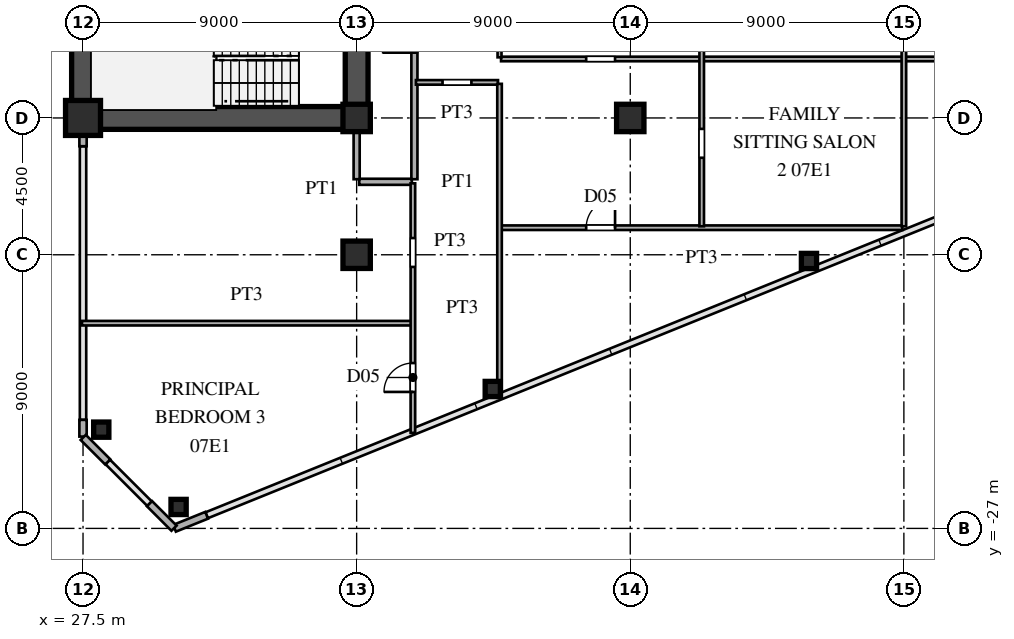
"""IFC4 building model, lengths in metres.
Left out: names, types, materials, properties, quantities, classifications, styles, units other than length and angle.
Written with IfcOpenShell. Run it as: python <this file> out.ifc"""

import sys

from ifc_helpers import new_model, si_unit, direction, frame, frame_2d, origin, origin_2d, place, context, subcontext, project, spatial, rectangle, hollow_rectangle, i_section, extrude, source, transform, mapped, element, fill, save


model = new_model("IFC4")
c1 = context("Model", 3, precision=1e-05, world=origin(), true_north=direction((0.0, 1.0)))
c2 = subcontext(c1, "Body", "Model", "MODEL_VIEW")
j1 = project(units=[si_unit("LENGTHUNIT", "METRE"), si_unit("PLANEANGLEUNIT", "RADIAN")], contexts=[c1])
p1 = place(None, origin())
s1 = spatial("IfcSite", under=j1, at=p1, CompositionType="ELEMENT")
p2 = place(p1, origin())
s2 = spatial("IfcBuilding", under=s1, at=p2, CompositionType="ELEMENT")
p3 = place(p2, frame((0.0, 0.0, 29.7)))
s3 = spatial("IfcBuildingStorey", under=s2, at=p3, CompositionType="ELEMENT", Elevation=29.7)
m1 = source(origin(), c2, "Body", "SweptSolid", [
    extrude(hollow_rectangle(XDim=1.15, YDim=1.15, WallThickness=0.048, at=origin_2d()), origin(), (0.0, 0.0, 1.0), 3.6),
])
p4 = place(p3, frame((27.5, -13.5, 0.0), z_axis=(0.0, 0.0, 1.0), x_axis=(1.0, 0.0, 0.0)))
e1 = element("IfcColumn", 1, at=p4, inside=s3, PredefinedType="COLUMN", context=c2, shape_type="MappedRepresentation", body=[
    mapped(m1, transform((0.0, 0.0, 0.0), scale=1.0)),
])
m2 = source(origin(), c2, "Body", "SweptSolid", [
    extrude(i_section(OverallWidth=0.9, OverallDepth=0.9, WebThickness=0.036, FlangeThickness=0.055, at=origin_2d()), origin(), (0.0, 0.0, 1.0), 3.6),
])
for number, where, z_axis, x_axis in (
    (2, (36.5, -18.0, 0.0), (0.0, 0.0, 1.0), (1.0, 0.0, 0.0)),
    (3, (36.5, -13.5, 0.0), (0.0, 0.0, 1.0), (1.0, 0.0, 0.0)),
    (4, (45.5, -13.5, 0.0), (0.0, 0.0, 1.0), (1.0, 0.0, 0.0)),
):
    element("IfcColumn", number, at=place(p3, frame(where, z_axis=z_axis, x_axis=x_axis)), inside=s3, PredefinedType="COLUMN", context=c2, shape_type="MappedRepresentation", body=[
        mapped(m2, transform((0.0, 0.0, 0.0), scale=1.0)),
    ])
m3 = source(origin(), c2, "Body", "SweptSolid", [
    extrude(hollow_rectangle(XDim=0.5, YDim=0.5, WallThickness=0.02, at=origin_2d()), origin(), (0.0, 0.0, 1.0), 3.6),
])
for number, where, z_axis, x_axis in (
    (5, (30.643, -26.295, 0.0), (0.0, 0.0, 1.0), (1.0, 0.0, 0.0)),
    (6, (28.1, -23.751, 0.0), (0.0, 0.0, 1.0), (1.0, 0.0, 0.0)),
    (7, (40.977, -22.414, 0.0), (0.0, 0.0, 1.0), (1.0, 0.0, 0.0)),
    (8, (51.378, -18.204, 0.0), (0.0, 0.0, 1.0), (1.0, 0.0, 0.0)),
):
    element("IfcColumn", number, at=place(p3, frame(where, z_axis=z_axis, x_axis=x_axis)), inside=s3, PredefinedType="COLUMN", context=c2, shape_type="MappedRepresentation", body=[
        mapped(m3, transform((0.0, 0.0, 0.0), scale=1.0)),
    ])
p5 = place(p3, frame((30.509, -26.996, 0.0), z_axis=(0.0, 0.0, 1.0), x_axis=(0.927007103665, 0.375043770452, 0.0)))
e9 = element("IfcWall", 9, at=p5, inside=s3, PredefinedType="SOLIDWALL", context=c2, shape_type="SweptSolid", body=[
    extrude(rectangle(XDim=1.14, YDim=0.24, at=frame_2d((0.57, 0.0))), origin(), (0.0, 0.0, 1.0), 3.38),
])
p6 = place(p3, frame((27.5, -23.98, 0.0), z_axis=(0.0, 0.0, 1.0), x_axis=(0.0, 1.0, 0.0)))
e10 = element("IfcWall", 10, at=p6, inside=s3, PredefinedType="SOLIDWALL", context=c2, shape_type="SweptSolid", body=[
    extrude(rectangle(XDim=0.55, YDim=0.24, at=frame_2d((0.275, 0.0))), origin(), (0.0, 0.0, 1.0), 3.38),
])
p7 = place(p3, frame((27.5, -14.43, 0.0), z_axis=(0.0, 0.0, 1.0), x_axis=(0.0, 1.0, 0.0)))
e11 = element("IfcWall", 11, at=p7, inside=s3, PredefinedType="SOLIDWALL", context=c2, shape_type="SweptSolid", body=[
    extrude(rectangle(XDim=0.55, YDim=0.24, at=frame_2d((0.275, 0.0))), origin(), (0.0, 0.0, 1.0), 2.88),
])
for number, where, z_axis, x_axis in (
    (12, (27.507, -24.007, 0.0), (0.0, 0.0, 1.0), (0.707, -0.707, 0.0)),
    (13, (29.687, -26.187, 0.0), (0.0, 0.0, 1.0), (0.707, -0.707, 0.0)),
):
    element("IfcWall", number, at=place(p3, frame(where, z_axis=z_axis, x_axis=x_axis)), inside=s3, PredefinedType="SOLIDWALL", context=c2, shape_type="SweptSolid", body=[
        extrude(rectangle(XDim=1.14, YDim=0.24, at=frame_2d((0.57, 0.0))), origin(), (0.0, 0.0, 1.0), 3.38),
    ])
p8 = place(p3, frame((27.5, -13.5, 0.0), z_axis=(0.0, 0.0, 1.0), x_axis=(0.0, 1.0, 0.0)))
e14 = element("IfcWall", 14, at=p8, inside=s3, PredefinedType="SHEAR", context=c2, shape_type="SweptSolid", body=[
    extrude(rectangle(XDim=12.2, YDim=0.75, at=frame_2d((6.1, 0.0))), origin(), (0.0, 0.0, 1.0), 3.38),
])
p9 = place(p3, frame((27.5, -13.5, 0.0), z_axis=(0.0, 0.0, 1.0), x_axis=(1.0, 0.0, 0.0)))
e15 = element("IfcWall", 15, at=p9, inside=s3, PredefinedType="SHEAR", context=c2, shape_type="SweptSolid", body=[
    extrude(rectangle(XDim=9.0, YDim=0.75, at=frame_2d((4.5, 0.0))), origin(), (0.0, 0.0, 1.0), 3.38),
])
p10 = place(p3, frame((36.5, -13.65, 0.0), z_axis=(0.0, 0.0, 1.0), x_axis=(0.0, 1.0, 0.0)))
e16 = element("IfcWall", 16, at=p10, inside=s3, PredefinedType="SHEAR", context=c2, shape_type="SweptSolid", body=[
    extrude(rectangle(XDim=7.15, YDim=0.75, at=frame_2d((3.575, 0.0))), origin(), (0.0, 0.0, 1.0), 3.38),
])
p11 = place(p10, frame((4.675, 0.0, 0.0)))
e17 = element("IfcOpeningElement", 17, at=p11, cuts=e16, PredefinedType="OPENING", context=c2, shape_type="SweptSolid", body=[
    extrude(rectangle(XDim=1.15, YDim=2.2, at=frame_2d((0.575, 1.1))), frame((0.0, 0.385, 0.0), z_axis=(0.0, -1.0, 0.0), x_axis=(1.0, 0.0, 0.0)), (0.0, 0.0, 1.0), 0.77),
])
p12 = place(p3, frame((27.465, -20.25, 0.0), z_axis=(0.0, 0.0, 1.0), x_axis=(1.0, 0.0, 0.0)))
e18 = element("IfcWall", 18, at=p12, inside=s3, PredefinedType="PARTITIONING", context=c2, shape_type="SweptSolid", body=[
    extrude(rectangle(XDim=10.835, YDim=0.15, at=frame_2d((5.417, 0.0))), origin(), (0.0, 0.0, 1.0), 3.38),
])
p13 = place(p3, frame((41.25, -17.11, 0.0), z_axis=(0.0, 0.0, 1.0), x_axis=(1.0, 0.0, 0.0)))
e19 = element("IfcWall", 19, at=p13, inside=s3, PredefinedType="PARTITIONING", context=c2, shape_type="SweptSolid", body=[
    extrude(rectangle(XDim=13.2, YDim=0.15, at=frame_2d((6.6, 0.0))), origin(), (0.0, 0.0, 1.0), 3.38),
])
p14 = place(p13, frame((2.8, 0.0, 0.0)))
e20 = element("IfcOpeningElement", 20, at=p14, cuts=e19, PredefinedType="OPENING", context=c2, shape_type="SweptSolid", body=[
    extrude(rectangle(XDim=0.95, YDim=2.15, at=frame_2d((0.475, 1.075))), frame((0.0, 0.085, 0.0), z_axis=(0.0, -1.0, 0.0), x_axis=(1.0, 0.0, 0.0)), (0.0, 0.0, 1.0), 0.17),
])
p15 = place(p3, frame((36.585, -15.6, 0.0), z_axis=(0.0, 0.0, 1.0), x_axis=(1.0, 0.0, 0.0)))
e21 = element("IfcWall", 21, at=p15, inside=s3, PredefinedType="PARTITIONING", context=c2, shape_type="SweptSolid", body=[
    extrude(rectangle(XDim=1.73, YDim=0.2, at=frame_2d((0.865, 0.0))), origin(), (0.0, 0.0, 1.0), 3.38),
])
p16 = place(p3, frame((38.45, -12.33, 0.0), z_axis=(0.0, 0.0, 1.0), x_axis=(1.0, 0.0, 0.0)))
e22 = element("IfcWall", 22, at=p16, inside=s3, PredefinedType="PARTITIONING", context=c2, shape_type="SweptSolid", body=[
    extrude(rectangle(XDim=2.7, YDim=0.15, at=frame_2d((1.35, 0.0))), origin(), (0.0, 0.0, 1.0), 3.38),
])
p17 = place(p16, frame((0.875, 0.0, 0.0)))
e23 = element("IfcOpeningElement", 23, at=p17, cuts=e22, PredefinedType="OPENING", context=c2, shape_type="SweptSolid", body=[
    extrude(rectangle(XDim=0.95, YDim=2.15, at=frame_2d((0.475, 1.075))), frame((0.0, 0.085, 0.0), z_axis=(0.0, -1.0, 0.0), x_axis=(1.0, 0.0, 0.0)), (0.0, 0.0, 1.0), 0.17),
])
p18 = place(p3, frame((41.25, -11.56, 0.0), z_axis=(0.0, 0.0, 1.0), x_axis=(1.0, 0.0, 0.0)))
e24 = element("IfcWall", 24, at=p18, inside=s3, PredefinedType="PARTITIONING", context=c2, shape_type="SweptSolid", body=[
    extrude(rectangle(XDim=27.44, YDim=0.15, at=frame_2d((13.72, 0.0))), origin(), (0.0, 0.0, 1.0), 3.38),
])
p19 = place(p18, frame((2.8, 0.0, 0.0)))
e25 = element("IfcOpeningElement", 25, at=p19, cuts=e24, PredefinedType="OPENING", context=c2, shape_type="SweptSolid", body=[
    extrude(rectangle(XDim=0.95, YDim=2.15, at=frame_2d((0.475, 1.075))), frame((0.0, 0.085, 0.0), z_axis=(0.0, -1.0, 0.0), x_axis=(1.0, 0.0, 0.0)), (0.0, 0.0, 1.0), 0.17),
])
p20 = place(p18, frame((15.625, 0.0, 0.0)))
e26 = element("IfcOpeningElement", 26, at=p20, cuts=e24, PredefinedType="OPENING", context=c2, shape_type="SweptSolid", body=[
    extrude(rectangle(XDim=0.95, YDim=2.15, at=frame_2d((0.475, 1.075))), frame((0.0, 0.085, 0.0), z_axis=(0.0, -1.0, 0.0), x_axis=(1.0, 0.0, 0.0)), (0.0, 0.0, 1.0), 0.17),
])
p21 = place(p3, frame((36.5, -15.515, 0.0), z_axis=(0.0, 0.0, 1.0), x_axis=(0.0, 1.0, 0.0)))
e27 = element("IfcWall", 27, at=p21, inside=s3, PredefinedType="PARTITIONING", context=c2, shape_type="SweptSolid", body=[
    extrude(rectangle(XDim=1.635, YDim=0.2, at=frame_2d((0.817, 0.0))), origin(), (0.0, 0.0, 1.0), 2.68),
])
p22 = place(p3, frame((38.35, -23.858, 0.0), z_axis=(0.0, 0.0, 1.0), x_axis=(0.0, 1.0, 0.0)))
e28 = element("IfcWall", 28, at=p22, inside=s3, PredefinedType="PARTITIONING", context=c2, shape_type="SweptSolid", body=[
    extrude(rectangle(XDim=8.208, YDim=0.15, at=frame_2d((4.104, 0.0))), origin(), (0.0, 0.0, 1.0), 3.38),
])
p23 = place(p22, frame((1.347, 0.0, 0.0)))
e29 = element("IfcOpeningElement", 29, at=p23, cuts=e28, PredefinedType="OPENING", context=c2, shape_type="SweptSolid", body=[
    extrude(rectangle(XDim=0.95, YDim=2.15, at=frame_2d((0.475, 1.075))), frame((0.0, 0.085, 0.0), z_axis=(0.0, -1.0, 0.0), x_axis=(1.0, 0.0, 0.0)), (0.0, 0.0, 1.0), 0.17),
])
p24 = place(p22, frame((5.458, 0.0, 0.0)))
e30 = element("IfcOpeningElement", 30, at=p24, cuts=e28, PredefinedType="OPENING", context=c2, shape_type="SweptSolid", body=[
    extrude(rectangle(XDim=0.95, YDim=2.15, at=frame_2d((0.475, 1.075))), frame((0.0, 0.085, 0.0), z_axis=(0.0, -1.0, 0.0), x_axis=(1.0, 0.0, 0.0)), (0.0, 0.0, 1.0), 0.17),
])
p25 = place(p3, frame((38.4, -15.515, 0.0), z_axis=(0.0, 0.0, 1.0), x_axis=(0.0, 1.0, 0.0)))
e31 = element("IfcWall", 31, at=p25, inside=s3, PredefinedType="PARTITIONING", context=c2, shape_type="SweptSolid", body=[
    extrude(rectangle(XDim=31.03, YDim=0.2, at=frame_2d((15.515, 0.0))), origin(), (0.0, 0.0, 1.0), 3.38),
])
p26 = place(p25, frame((4.163, 0.0, 0.0)))
e32 = element("IfcOpeningElement", 32, at=p26, cuts=e31, PredefinedType="OPENING", context=c2, shape_type="SweptSolid", body=[
    extrude(rectangle(XDim=1.05, YDim=2.25, at=frame_2d((0.525, 1.125))), frame((0.0, 0.11, 0.0), z_axis=(0.0, -1.0, 0.0), x_axis=(1.0, 0.0, 0.0)), (0.0, 0.0, 1.0), 0.22),
])
p27 = place(p25, frame((15.538, 0.0, 0.0)))
e33 = element("IfcOpeningElement", 33, at=p27, cuts=e31, PredefinedType="OPENING", context=c2, shape_type="SweptSolid", body=[
    extrude(rectangle(XDim=1.05, YDim=2.25, at=frame_2d((0.525, 1.125))), frame((0.0, 0.11, 0.0), z_axis=(0.0, -1.0, 0.0), x_axis=(1.0, 0.0, 0.0)), (0.0, 0.0, 1.0), 0.22),
])
p28 = place(p25, frame((26.635, 0.0, 0.0)))
e34 = element("IfcOpeningElement", 34, at=p28, cuts=e31, PredefinedType="OPENING", context=c2, shape_type="SweptSolid", body=[
    extrude(rectangle(XDim=1.05, YDim=2.25, at=frame_2d((0.525, 1.125))), frame((0.0, 0.11, 0.0), z_axis=(0.0, -1.0, 0.0), x_axis=(1.0, 0.0, 0.0)), (0.0, 0.0, 1.0), 0.22),
])
p29 = place(p3, frame((41.2, -22.704, 0.0), z_axis=(0.0, 0.0, 1.0), x_axis=(0.0, 1.0, 0.0)))
e35 = element("IfcWall", 35, at=p29, inside=s3, PredefinedType="PARTITIONING", context=c2, shape_type="SweptSolid", body=[
    extrude(rectangle(XDim=10.326, YDim=0.15, at=frame_2d((5.163, 0.0))), origin(), (0.0, 0.0, 1.0), 3.38),
])
p30 = place(p3, frame((41.2, -11.506, 0.0), z_axis=(0.0, 0.0, 1.0), x_axis=(0.0, 1.0, 0.0)))
e36 = element("IfcWall", 36, at=p30, inside=s3, PredefinedType="PARTITIONING", context=c2, shape_type="SweptSolid", body=[
    extrude(rectangle(XDim=14.456, YDim=0.13, at=frame_2d((7.228, 0.0))), origin(), (0.0, 0.0, 1.0), 3.38),
])
p31 = place(p30, frame((0.589, 0.0, 0.0)))
e37 = element("IfcOpeningElement", 37, at=p31, cuts=e36, PredefinedType="OPENING", context=c2, shape_type="SweptSolid", body=[
    extrude(rectangle(XDim=0.95, YDim=2.15, at=frame_2d((0.475, 1.075))), frame((0.0, 0.075, 0.0), z_axis=(0.0, -1.0, 0.0), x_axis=(1.0, 0.0, 0.0)), (0.0, 0.0, 1.0), 0.15),
])
p32 = place(p30, frame((11.781, 0.0, 0.0)))
e38 = element("IfcOpeningElement", 38, at=p32, cuts=e36, PredefinedType="OPENING", context=c2, shape_type="SweptSolid", body=[
    extrude(rectangle(XDim=0.95, YDim=2.15, at=frame_2d((0.475, 1.075))), frame((0.0, 0.075, 0.0), z_axis=(0.0, -1.0, 0.0), x_axis=(1.0, 0.0, 0.0)), (0.0, 0.0, 1.0), 0.15),
])
p33 = place(p3, frame((47.85, -17.063, 0.0), z_axis=(0.0, 0.0, 1.0), x_axis=(0.0, 1.0, 0.0)))
e39 = element("IfcWall", 39, at=p33, inside=s3, PredefinedType="PARTITIONING", context=c2, shape_type="SweptSolid", body=[
    extrude(rectangle(XDim=34.626, YDim=0.15, at=frame_2d((17.313, 0.0))), origin(), (0.0, 0.0, 1.0), 3.38),
])
p34 = place(p33, frame((7.81, 0.0, 0.0)))
e40 = element("IfcOpeningElement", 40, at=p34, cuts=e39, PredefinedType="OPENING", context=c2, shape_type="SweptSolid", body=[
    extrude(rectangle(XDim=0.95, YDim=2.15, at=frame_2d((0.475, 1.075))), frame((0.0, 0.085, 0.0), z_axis=(0.0, -1.0, 0.0), x_axis=(1.0, 0.0, 0.0)), (0.0, 0.0, 1.0), 0.17),
])
p35 = place(p33, frame((2.253, 0.0, 0.0)))
e41 = element("IfcOpeningElement", 41, at=p35, cuts=e39, PredefinedType="OPENING", context=c2, shape_type="SweptSolid", body=[
    extrude(rectangle(XDim=0.95, YDim=2.15, at=frame_2d((0.475, 1.075))), frame((0.0, 0.085, 0.0), z_axis=(0.0, -1.0, 0.0), x_axis=(1.0, 0.0, 0.0)), (0.0, 0.0, 1.0), 0.17),
])
p36 = place(p33, frame((17.338, 0.0, 0.0)))
e42 = element("IfcOpeningElement", 42, at=p36, cuts=e39, PredefinedType="OPENING", context=c2, shape_type="SweptSolid", body=[
    extrude(rectangle(XDim=0.95, YDim=2.15, at=frame_2d((0.475, 1.075))), frame((0.0, 0.085, 0.0), z_axis=(0.0, -1.0, 0.0), x_axis=(1.0, 0.0, 0.0)), (0.0, 0.0, 1.0), 0.17),
])
p37 = place(p33, frame((26.616, 0.0, 0.0)))
e43 = element("IfcOpeningElement", 43, at=p37, cuts=e39, PredefinedType="OPENING", context=c2, shape_type="SweptSolid", body=[
    extrude(rectangle(XDim=0.95, YDim=2.15, at=frame_2d((0.475, 1.075))), frame((0.0, 0.085, 0.0), z_axis=(0.0, -1.0, 0.0), x_axis=(1.0, 0.0, 0.0)), (0.0, 0.0, 1.0), 0.17),
])
p38 = place(p3, frame((54.5, -17.063, 0.0), z_axis=(0.0, 0.0, 1.0), x_axis=(0.0, 1.0, 0.0)))
e44 = element("IfcWall", 44, at=p38, inside=s3, PredefinedType="PARTITIONING", context=c2, shape_type="SweptSolid", body=[
    extrude(rectangle(XDim=34.384, YDim=0.15, at=frame_2d((17.192, 0.0))), origin(), (0.0, 0.0, 1.0), 2.68),
])
p39 = place(p38, frame((7.81, 0.0, 0.0)))
e45 = element("IfcOpeningElement", 45, at=p39, cuts=e44, PredefinedType="OPENING", context=c2, shape_type="SweptSolid", body=[
    extrude(rectangle(XDim=0.95, YDim=2.15, at=frame_2d((0.475, 1.075))), frame((0.0, 0.085, 0.0), z_axis=(0.0, -1.0, 0.0), x_axis=(1.0, 0.0, 0.0)), (0.0, 0.0, 1.0), 0.17),
])
p40 = place(p38, frame((17.338, 0.0, 0.0)))
e46 = element("IfcOpeningElement", 46, at=p40, cuts=e44, PredefinedType="OPENING", context=c2, shape_type="SweptSolid", body=[
    extrude(rectangle(XDim=0.95, YDim=2.15, at=frame_2d((0.475, 1.075))), frame((0.0, 0.085, 0.0), z_axis=(0.0, -1.0, 0.0), x_axis=(1.0, 0.0, 0.0)), (0.0, 0.0, 1.0), 0.17),
])
p41 = place(p38, frame((13.131, 0.0, 0.0)))
e47 = element("IfcOpeningElement", 47, at=p41, cuts=e44, PredefinedType="OPENING", context=c2, shape_type="SweptSolid", body=[
    extrude(rectangle(XDim=0.95, YDim=2.15, at=frame_2d((0.475, 1.075))), frame((0.0, 0.085, 0.0), z_axis=(0.0, -1.0, 0.0), x_axis=(1.0, 0.0, 0.0)), (0.0, 0.0, 1.0), 0.17),
])
p42 = place(p38, frame((22.131, 0.0, 0.0)))
e48 = element("IfcOpeningElement", 48, at=p42, cuts=e44, PredefinedType="OPENING", context=c2, shape_type="SweptSolid", body=[
    extrude(rectangle(XDim=0.95, YDim=2.15, at=frame_2d((0.475, 1.075))), frame((0.0, 0.085, 0.0), z_axis=(0.0, -1.0, 0.0), x_axis=(1.0, 0.0, 0.0)), (0.0, 0.0, 1.0), 0.17),
])
p43 = place(p38, frame((26.616, 0.0, 0.0)))
e49 = element("IfcOpeningElement", 49, at=p43, cuts=e44, PredefinedType="OPENING", context=c2, shape_type="SweptSolid", body=[
    extrude(rectangle(XDim=0.95, YDim=2.15, at=frame_2d((0.475, 1.075))), frame((0.0, 0.085, 0.0), z_axis=(0.0, -1.0, 0.0), x_axis=(1.0, 0.0, 0.0)), (0.0, 0.0, 1.0), 0.17),
])
m4 = source(origin(), c2, "Body", "SweptSolid", [
    extrude(rectangle(XDim=0.95, YDim=2.15, at=frame_2d((0.475, 1.075))), frame((0.0, 0.025, 0.0), z_axis=(0.0, -1.0, 0.0), x_axis=(1.0, 0.0, 0.0)), (0.0, 0.0, 1.0), 0.05),
])
p44 = place(p14, origin())
e50 = element("IfcDoor", 50, at=p44, inside=s3, OperationType="SINGLE_SWING_RIGHT", PredefinedType="DOOR", context=c2, shape_type="MappedRepresentation", body=[
    mapped(m4, transform((0.0, 0.0, 0.0), scale=1.0)),
])
fill(e20, e50)
p45 = place(p23, origin())
e51 = element("IfcDoor", 51, at=p45, inside=s3, OperationType="SINGLE_SWING_LEFT", PredefinedType="DOOR", context=c2, shape_type="MappedRepresentation", body=[
    mapped(m4, transform((0.0, 0.0, 0.0), scale=1.0)),
])
fill(e29, e51)
m5 = source(origin(), c2, "Body", "SweptSolid", [
    extrude(rectangle(XDim=1.05, YDim=2.25, at=frame_2d((0.525, 1.125))), frame((0.0, 0.025, 0.0), z_axis=(0.0, -1.0, 0.0), x_axis=(1.0, 0.0, 0.0)), (0.0, 0.0, 1.0), 0.05),
])
p46 = place(p26, origin())
e52 = element("IfcDoor", 52, at=p46, inside=s3, OperationType="SINGLE_SWING_LEFT", PredefinedType="DOOR", context=c2, shape_type="MappedRepresentation", body=[
    mapped(m5, transform((0.0, 0.0, 0.0), scale=1.0)),
])
fill(e32, e52)
save(model, sys.argv[1])
